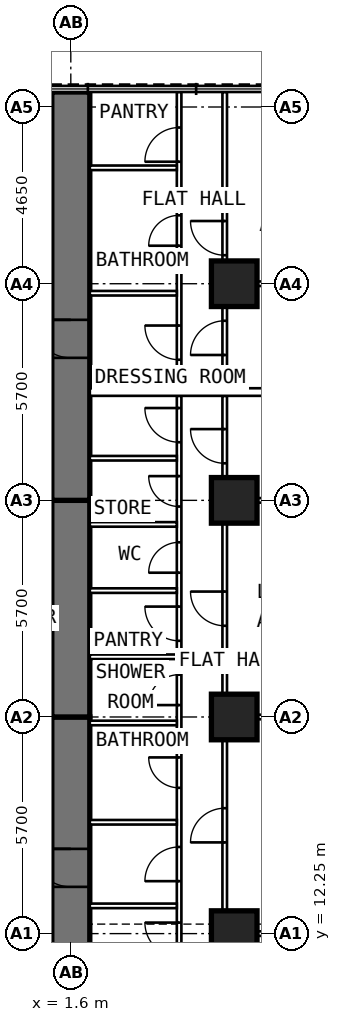
"""IFC4 building model, lengths in metres.
Left out: names, types, materials, properties, quantities, classifications, styles, units other than length and angle.
Written with IfcOpenShell. Run it as: python <this file> out.ifc"""

import sys

from ifc_helpers import new_model, si_unit, direction, frame, frame_2d, origin, origin_2d, place, context, subcontext, project, spatial, rectangle, extrude, element, fill, save


model = new_model("IFC4")
c1 = context("Model", 3, precision=1e-05, world=origin(), true_north=direction((0.0, 1.0)))
c2 = subcontext(c1, "Body", "Model", "MODEL_VIEW")
j1 = project(units=[si_unit("LENGTHUNIT", "METRE"), si_unit("PLANEANGLEUNIT", "RADIAN")], contexts=[c1])
p1 = place(None, origin())
s1 = spatial("IfcSite", under=j1, at=p1, CompositionType="ELEMENT")
p2 = place(p1, origin())
s2 = spatial("IfcBuilding", under=s1, at=p2, CompositionType="ELEMENT")
p3 = place(p2, frame((0.0, 0.0, 71.8)))
s3 = spatial("IfcBuildingStorey", under=s2, at=p3, CompositionType="ELEMENT", Elevation=71.8)
for number, where, z_axis, x_axis in (
    (1, (5.9, 12.25, 0.0), (0.0, 0.0, 1.0), (0.0, 1.0, 0.0)),
    (2, (5.9, 17.95, 0.0), (0.0, 0.0, 1.0), (0.0, 1.0, 0.0)),
    (3, (5.9, 23.65, 0.0), (0.0, 0.0, 1.0), (0.0, 1.0, 0.0)),
    (4, (5.9, 29.35, 0.0), (0.0, 0.0, 1.0), (0.0, 1.0, 0.0)),
):
    element("IfcColumn", number, at=place(p3, frame(where, z_axis=z_axis, x_axis=x_axis)), inside=s3, PredefinedType="COLUMN", context=c2, shape_type="SweptSolid", body=[
        extrude(rectangle(XDim=1.2, YDim=1.2, at=origin_2d()), origin(), (0.0, 0.0, 1.0), 3.6),
    ])
p4 = place(p3, frame((1.6, 9.6, 0.0), z_axis=(0.0, 0.0, 1.0), x_axis=(0.0, 1.0, 0.0)))
e5 = element("IfcWall", 5, at=p4, inside=s3, PredefinedType="SHEAR", context=c2, shape_type="SweptSolid", body=[
    extrude(rectangle(XDim=8.35, YDim=1.0, at=frame_2d((4.175, 0.0))), origin(), (0.0, 0.0, 1.0), 3.6),
])
p5 = place(p4, frame((3.88, 0.0, 0.0)))
e6 = element("IfcOpeningElement", 6, at=p5, cuts=e5, PredefinedType="OPENING", context=c2, shape_type="SweptSolid", body=[
    extrude(rectangle(XDim=1.0, YDim=2.1, at=frame_2d((0.5, 1.05))), frame((0.0, 0.512, 0.0), z_axis=(0.0, -1.0, 0.0), x_axis=(1.0, 0.0, 0.0)), (0.0, 0.0, 1.0), 1.024),
])
p6 = place(p3, frame((1.6, 17.95, 0.0), z_axis=(0.0, 0.0, 1.0), x_axis=(0.0, 1.0, 0.0)))
e7 = element("IfcWall", 7, at=p6, inside=s3, PredefinedType="SHEAR", context=c2, shape_type="SweptSolid", body=[
    extrude(rectangle(XDim=5.7, YDim=1.0, at=frame_2d((2.85, 0.0))), origin(), (0.0, 0.0, 1.0), 3.6),
])
p7 = place(p3, frame((1.6, 23.65, 0.0), z_axis=(0.0, 0.0, 1.0), x_axis=(0.0, 1.0, 0.0)))
e8 = element("IfcWall", 8, at=p7, inside=s3, PredefinedType="SHEAR", context=c2, shape_type="SweptSolid", body=[
    extrude(rectangle(XDim=10.745, YDim=1.0, at=frame_2d((5.373, 0.0))), origin(), (0.0, 0.0, 1.0), 3.6),
])
p8 = place(p7, frame((3.75, 0.0, 0.0)))
e9 = element("IfcOpeningElement", 9, at=p8, cuts=e8, PredefinedType="OPENING", context=c2, shape_type="SweptSolid", body=[
    extrude(rectangle(XDim=1.0, YDim=2.1, at=frame_2d((0.5, 1.05))), frame((0.0, 0.512, 0.0), z_axis=(0.0, -1.0, 0.0), x_axis=(1.0, 0.0, 0.0)), (0.0, 0.0, 1.0), 1.024),
])
p9 = place(p3, frame((4.45, 10.1, 0.0), z_axis=(0.0, 0.0, 1.0), x_axis=(0.0, 1.0, 0.0)))
e10 = element("IfcWall", 10, at=p9, inside=s3, PredefinedType="PARTITIONING", context=c2, shape_type="SweptSolid", body=[
    extrude(rectangle(XDim=16.3, YDim=0.12, at=frame_2d((8.15, 0.0))), origin(), (0.0, 0.0, 1.0), 3.35),
])
p10 = place(p9, frame((1.54, 0.0, 0.0)))
e11 = element("IfcOpeningElement", 11, at=p10, cuts=e10, PredefinedType="OPENING", context=c2, shape_type="SweptSolid", body=[
    extrude(rectangle(XDim=0.9, YDim=2.1, at=frame_2d((0.45, 1.05))), frame((0.0, 0.072, 0.0), z_axis=(0.0, -1.0, 0.0), x_axis=(1.0, 0.0, 0.0)), (0.0, 0.0, 1.0), 0.144),
])
p11 = place(p9, frame((3.53, 0.0, 0.0)))
e12 = element("IfcOpeningElement", 12, at=p11, cuts=e10, PredefinedType="OPENING", context=c2, shape_type="SweptSolid", body=[
    extrude(rectangle(XDim=0.9, YDim=2.1, at=frame_2d((0.45, 1.05))), frame((0.0, 0.072, 0.0), z_axis=(0.0, -1.0, 0.0), x_axis=(1.0, 0.0, 0.0)), (0.0, 0.0, 1.0), 0.144),
])
p12 = place(p9, frame((5.986, 0.0, 0.0)))
e13 = element("IfcOpeningElement", 13, at=p12, cuts=e10, PredefinedType="OPENING", context=c2, shape_type="SweptSolid", body=[
    extrude(rectangle(XDim=0.8, YDim=2.1, at=frame_2d((0.4, 1.05))), frame((0.0, 0.072, 0.0), z_axis=(0.0, -1.0, 0.0), x_axis=(1.0, 0.0, 0.0)), (0.0, 0.0, 1.0), 0.144),
])
p13 = place(p9, frame((8.163, 0.0, 0.0)))
e14 = element("IfcOpeningElement", 14, at=p13, cuts=e10, PredefinedType="OPENING", context=c2, shape_type="SweptSolid", body=[
    extrude(rectangle(XDim=0.8, YDim=2.1, at=frame_2d((0.4, 1.05))), frame((0.0, 0.072, 0.0), z_axis=(0.0, -1.0, 0.0), x_axis=(1.0, 0.0, 0.0)), (0.0, 0.0, 1.0), 0.144),
])
p14 = place(p9, frame((9.855, 0.0, 0.0)))
e15 = element("IfcOpeningElement", 15, at=p14, cuts=e10, PredefinedType="OPENING", context=c2, shape_type="SweptSolid", body=[
    extrude(rectangle(XDim=0.9, YDim=2.1, at=frame_2d((0.45, 1.05))), frame((0.0, 0.072, 0.0), z_axis=(0.0, -1.0, 0.0), x_axis=(1.0, 0.0, 0.0)), (0.0, 0.0, 1.0), 0.144),
])
p15 = place(p9, frame((11.646, 0.0, 0.0)))
e16 = element("IfcOpeningElement", 16, at=p15, cuts=e10, PredefinedType="OPENING", context=c2, shape_type="SweptSolid", body=[
    extrude(rectangle(XDim=0.8, YDim=2.1, at=frame_2d((0.4, 1.05))), frame((0.0, 0.072, 0.0), z_axis=(0.0, -1.0, 0.0), x_axis=(1.0, 0.0, 0.0)), (0.0, 0.0, 1.0), 0.144),
])
p16 = place(p9, frame((13.388, 0.0, 0.0)))
e17 = element("IfcOpeningElement", 17, at=p16, cuts=e10, PredefinedType="OPENING", context=c2, shape_type="SweptSolid", body=[
    extrude(rectangle(XDim=0.8, YDim=2.1, at=frame_2d((0.4, 1.05))), frame((0.0, 0.072, 0.0), z_axis=(0.0, -1.0, 0.0), x_axis=(1.0, 0.0, 0.0)), (0.0, 0.0, 1.0), 0.144),
])
p17 = place(p9, frame((15.079, 0.0, 0.0)))
e18 = element("IfcOpeningElement", 18, at=p17, cuts=e10, PredefinedType="OPENING", context=c2, shape_type="SweptSolid", body=[
    extrude(rectangle(XDim=0.9, YDim=2.1, at=frame_2d((0.45, 1.05))), frame((0.0, 0.072, 0.0), z_axis=(0.0, -1.0, 0.0), x_axis=(1.0, 0.0, 0.0)), (0.0, 0.0, 1.0), 0.144),
])
p18 = place(p3, frame((5.65, 9.6, 0.0), z_axis=(0.0, 0.0, 1.0), x_axis=(0.0, 1.0, 0.0)))
e19 = element("IfcWall", 19, at=p18, inside=s3, PredefinedType="PARTITIONING", context=c2, shape_type="SweptSolid", body=[
    extrude(rectangle(XDim=16.8, YDim=0.12, at=frame_2d((8.4, 0.0))), origin(), (0.0, 0.0, 1.0), 3.35),
])
p19 = place(p18, frame((1.0, 0.0, 0.0)))
e20 = element("IfcOpeningElement", 20, at=p19, cuts=e19, PredefinedType="OPENING", context=c2, shape_type="SweptSolid", body=[
    extrude(rectangle(XDim=0.9, YDim=2.1, at=frame_2d((0.45, 1.05))), frame((0.0, 0.072, 0.0), z_axis=(0.0, -1.0, 0.0), x_axis=(1.0, 0.0, 0.0)), (0.0, 0.0, 1.0), 0.144),
])
p20 = place(p18, frame((5.05, 0.0, 0.0)))
e21 = element("IfcOpeningElement", 21, at=p20, cuts=e19, PredefinedType="OPENING", context=c2, shape_type="SweptSolid", body=[
    extrude(rectangle(XDim=0.9, YDim=2.1, at=frame_2d((0.45, 1.05))), frame((0.0, 0.072, 0.0), z_axis=(0.0, -1.0, 0.0), x_axis=(1.0, 0.0, 0.0)), (0.0, 0.0, 1.0), 0.144),
])
p21 = place(p18, frame((10.75, 0.0, 0.0)))
e22 = element("IfcOpeningElement", 22, at=p21, cuts=e19, PredefinedType="OPENING", context=c2, shape_type="SweptSolid", body=[
    extrude(rectangle(XDim=0.9, YDim=2.1, at=frame_2d((0.45, 1.05))), frame((0.0, 0.072, 0.0), z_axis=(0.0, -1.0, 0.0), x_axis=(1.0, 0.0, 0.0)), (0.0, 0.0, 1.0), 0.144),
])
p22 = place(p18, frame((15.025, 0.0, 0.0)))
e23 = element("IfcOpeningElement", 23, at=p22, cuts=e19, PredefinedType="OPENING", context=c2, shape_type="SweptSolid", body=[
    extrude(rectangle(XDim=0.9, YDim=2.1, at=frame_2d((0.45, 1.05))), frame((0.0, 0.072, 0.0), z_axis=(0.0, -1.0, 0.0), x_axis=(1.0, 0.0, 0.0)), (0.0, 0.0, 1.0), 0.144),
])
for number, where, z_axis, x_axis in (
    (24, (5.71, 12.25, 0.0), (0.0, 0.0, 1.0), (1.0, 0.0, 0.0)),
    (25, (5.71, 17.95, 0.0), (0.0, 0.0, 1.0), (1.0, 0.0, 0.0)),
    (26, (5.71, 23.65, 0.0), (0.0, 0.0, 1.0), (1.0, 0.0, 0.0)),
):
    element("IfcWall", number, at=place(p3, frame(where, z_axis=z_axis, x_axis=x_axis)), inside=s3, PredefinedType="PARTITIONING", context=c2, shape_type="SweptSolid", body=[
        extrude(rectangle(XDim=4.99, YDim=0.12, at=frame_2d((2.495, 0.0))), origin(), (0.0, 0.0, 1.0), 2.45),
    ])
for number, where, z_axis, x_axis in (
    (27, (2.1, 12.98, 0.0), (0.0, 0.0, 1.0), (1.0, 0.0, 0.0)),
    (28, (2.1, 15.18, 0.0), (0.0, 0.0, 1.0), (1.0, 0.0, 0.0)),
):
    element("IfcWall", number, at=place(p3, frame(where, z_axis=z_axis, x_axis=x_axis)), inside=s3, PredefinedType="PARTITIONING", context=c2, shape_type="SweptSolid", body=[
        extrude(rectangle(XDim=2.29, YDim=0.12, at=frame_2d((1.145, 0.0))), origin(), (0.0, 0.0, 1.0), 3.35),
    ])
p23 = place(p3, frame((2.1, 17.792, 0.0), z_axis=(0.0, 0.0, 1.0), x_axis=(1.0, 0.0, 0.0)))
e29 = element("IfcWall", 29, at=p23, inside=s3, PredefinedType="PARTITIONING", context=c2, shape_type="SweptSolid", body=[
    extrude(rectangle(XDim=2.29, YDim=0.12, at=frame_2d((1.145, 0.0))), origin(), (0.0, 0.0, 1.0), 2.45),
])
for number, where, z_axis, x_axis in (
    (30, (2.1, 19.534, 0.0), (0.0, 0.0, 1.0), (1.0, 0.0, 0.0)),
    (31, (2.1, 21.275, 0.0), (0.0, 0.0, 1.0), (1.0, 0.0, 0.0)),
    (32, (2.1, 23.017, 0.0), (0.0, 0.0, 1.0), (1.0, 0.0, 0.0)),
    (33, (2.1, 24.759, 0.0), (0.0, 0.0, 1.0), (1.0, 0.0, 0.0)),
):
    element("IfcWall", number, at=place(p3, frame(where, z_axis=z_axis, x_axis=x_axis)), inside=s3, PredefinedType="PARTITIONING", context=c2, shape_type="SweptSolid", body=[
        extrude(rectangle(XDim=2.29, YDim=0.12, at=frame_2d((1.145, 0.0))), origin(), (0.0, 0.0, 1.0), 3.35),
    ])
p24 = place(p3, frame((4.45, 26.6, 0.0), z_axis=(0.0, 0.0, 1.0), x_axis=(0.0, 1.0, 0.0)))
e34 = element("IfcWall", 34, at=p24, inside=s3, PredefinedType="PARTITIONING", context=c2, shape_type="SweptSolid", body=[
    extrude(rectangle(XDim=7.795, YDim=0.12, at=frame_2d((3.897, 0.0))), origin(), (0.0, 0.0, 1.0), 3.35),
])
p25 = place(p24, frame((0.75, 0.0, 0.0)))
e35 = element("IfcOpeningElement", 35, at=p25, cuts=e34, PredefinedType="OPENING", context=c2, shape_type="SweptSolid", body=[
    extrude(rectangle(XDim=0.9, YDim=2.1, at=frame_2d((0.45, 1.05))), frame((0.0, 0.072, 0.0), z_axis=(0.0, -1.0, 0.0), x_axis=(1.0, 0.0, 0.0)), (0.0, 0.0, 1.0), 0.144),
])
p26 = place(p24, frame((3.75, 0.0, 0.0)))
e36 = element("IfcOpeningElement", 36, at=p26, cuts=e34, PredefinedType="OPENING", context=c2, shape_type="SweptSolid", body=[
    extrude(rectangle(XDim=0.8, YDim=2.1, at=frame_2d((0.4, 1.05))), frame((0.0, 0.072, 0.0), z_axis=(0.0, -1.0, 0.0), x_axis=(1.0, 0.0, 0.0)), (0.0, 0.0, 1.0), 0.144),
])
p27 = place(p24, frame((5.96, 0.0, 0.0)))
e37 = element("IfcOpeningElement", 37, at=p27, cuts=e34, PredefinedType="OPENING", context=c2, shape_type="SweptSolid", body=[
    extrude(rectangle(XDim=0.9, YDim=2.1, at=frame_2d((0.45, 1.05))), frame((0.0, 0.072, 0.0), z_axis=(0.0, -1.0, 0.0), x_axis=(1.0, 0.0, 0.0)), (0.0, 0.0, 1.0), 0.144),
])
p28 = place(p3, frame((5.65, 26.6, 0.0), z_axis=(0.0, 0.0, 1.0), x_axis=(0.0, 1.0, 0.0)))
e38 = element("IfcWall", 38, at=p28, inside=s3, PredefinedType="PARTITIONING", context=c2, shape_type="SweptSolid", body=[
    extrude(rectangle(XDim=7.795, YDim=0.12, at=frame_2d((3.897, 0.0))), origin(), (0.0, 0.0, 1.0), 3.35),
])
p29 = place(p28, frame((0.875, 0.0, 0.0)))
e39 = element("IfcOpeningElement", 39, at=p29, cuts=e38, PredefinedType="OPENING", context=c2, shape_type="SweptSolid", body=[
    extrude(rectangle(XDim=0.9, YDim=2.1, at=frame_2d((0.45, 1.05))), frame((0.0, 0.072, 0.0), z_axis=(0.0, -1.0, 0.0), x_axis=(1.0, 0.0, 0.0)), (0.0, 0.0, 1.0), 0.144),
])
p30 = place(p28, frame((3.5, 0.0, 0.0)))
e40 = element("IfcOpeningElement", 40, at=p30, cuts=e38, PredefinedType="OPENING", context=c2, shape_type="SweptSolid", body=[
    extrude(rectangle(XDim=0.9, YDim=2.1, at=frame_2d((0.45, 1.05))), frame((0.0, 0.072, 0.0), z_axis=(0.0, -1.0, 0.0), x_axis=(1.0, 0.0, 0.0)), (0.0, 0.0, 1.0), 0.144),
])
p31 = place(p3, frame((5.71, 29.35, 0.0), z_axis=(0.0, 0.0, 1.0), x_axis=(1.0, 0.0, 0.0)))
e41 = element("IfcWall", 41, at=p31, inside=s3, PredefinedType="PARTITIONING", context=c2, shape_type="SweptSolid", body=[
    extrude(rectangle(XDim=4.99, YDim=0.12, at=frame_2d((2.495, 0.0))), origin(), (0.0, 0.0, 1.0), 2.45),
])
p32 = place(p3, frame((2.1, 29.1, 0.0), z_axis=(0.0, 0.0, 1.0), x_axis=(1.0, 0.0, 0.0)))
e42 = element("IfcWall", 42, at=p32, inside=s3, PredefinedType="PARTITIONING", context=c2, shape_type="SweptSolid", body=[
    extrude(rectangle(XDim=2.29, YDim=0.12, at=frame_2d((1.145, 0.0))), origin(), (0.0, 0.0, 1.0), 2.45),
])
p33 = place(p3, frame((2.1, 32.4, 0.0), z_axis=(0.0, 0.0, 1.0), x_axis=(1.0, 0.0, 0.0)))
e43 = element("IfcWall", 43, at=p33, inside=s3, PredefinedType="PARTITIONING", context=c2, shape_type="SweptSolid", body=[
    extrude(rectangle(XDim=2.29, YDim=0.12, at=frame_2d((1.145, 0.0))), origin(), (0.0, 0.0, 1.0), 3.35),
])
p34 = place(p3, frame((2.1, 26.5, 0.0), z_axis=(0.0, 0.0, 1.0), x_axis=(1.0, 0.0, 0.0)))
e44 = element("IfcWall", 44, at=p34, inside=s3, PredefinedType="PARTITIONING", context=c2, shape_type="SweptSolid", body=[
    extrude(rectangle(XDim=8.6, YDim=0.2, at=frame_2d((4.3, 0.0))), origin(), (0.0, 0.0, 1.0), 3.35),
])
p35 = place(p5, origin())
e45 = element("IfcDoor", 45, at=p35, inside=s3, OperationType="SINGLE_SWING_RIGHT", PredefinedType="DOOR", context=c2, shape_type="SweptSolid", body=[
    extrude(rectangle(XDim=1.0, YDim=2.1, at=frame_2d((0.5, 1.05))), frame((0.0, 0.25, 0.0), z_axis=(0.0, -1.0, 0.0), x_axis=(1.0, 0.0, 0.0)), (0.0, 0.0, 1.0), 0.5),
])
fill(e6, e45)
p36 = place(p20, origin())
e46 = element("IfcDoor", 46, at=p36, inside=s3, OperationType="SINGLE_SWING_LEFT", PredefinedType="DOOR", context=c2, shape_type="SweptSolid", body=[
    extrude(rectangle(XDim=0.9, YDim=2.1, at=frame_2d((0.45, 1.05))), frame((0.0, 0.025, 0.0), z_axis=(0.0, -1.0, 0.0), x_axis=(1.0, 0.0, 0.0)), (0.0, 0.0, 1.0), 0.05),
])
fill(e21, e46)
p37 = place(p21, origin())
e47 = element("IfcDoor", 47, at=p37, inside=s3, OperationType="SINGLE_SWING_RIGHT", PredefinedType="DOOR", context=c2, shape_type="SweptSolid", body=[
    extrude(rectangle(XDim=0.9, YDim=2.1, at=frame_2d((0.45, 1.05))), frame((0.0, 0.025, 0.0), z_axis=(0.0, -1.0, 0.0), x_axis=(1.0, 0.0, 0.0)), (0.0, 0.0, 1.0), 0.05),
])
fill(e22, e47)
p38 = place(p22, origin())
e48 = element("IfcDoor", 48, at=p38, inside=s3, OperationType="SINGLE_SWING_RIGHT", PredefinedType="DOOR", context=c2, shape_type="SweptSolid", body=[
    extrude(rectangle(XDim=0.9, YDim=2.1, at=frame_2d((0.45, 1.05))), frame((0.0, 0.025, 0.0), z_axis=(0.0, -1.0, 0.0), x_axis=(1.0, 0.0, 0.0)), (0.0, 0.0, 1.0), 0.05),
])
fill(e23, e48)
p39 = place(p10, origin())
e49 = element("IfcDoor", 49, at=p39, inside=s3, OperationType="SINGLE_SWING_RIGHT", PredefinedType="DOOR", context=c2, shape_type="SweptSolid", body=[
    extrude(rectangle(XDim=0.9, YDim=2.1, at=frame_2d((0.45, 1.05))), frame((0.0, 0.025, 0.0), z_axis=(0.0, -1.0, 0.0), x_axis=(1.0, 0.0, 0.0)), (0.0, 0.0, 1.0), 0.05),
])
fill(e11, e49)
p40 = place(p11, origin())
e50 = element("IfcDoor", 50, at=p40, inside=s3, OperationType="SINGLE_SWING_LEFT", PredefinedType="DOOR", context=c2, shape_type="SweptSolid", body=[
    extrude(rectangle(XDim=0.9, YDim=2.1, at=frame_2d((0.45, 1.05))), frame((0.0, 0.025, 0.0), z_axis=(0.0, -1.0, 0.0), x_axis=(1.0, 0.0, 0.0)), (0.0, 0.0, 1.0), 0.05),
])
fill(e12, e50)
p41 = place(p12, origin())
e51 = element("IfcDoor", 51, at=p41, inside=s3, OperationType="SINGLE_SWING_RIGHT", PredefinedType="DOOR", context=c2, shape_type="SweptSolid", body=[
    extrude(rectangle(XDim=0.8, YDim=2.1, at=frame_2d((0.4, 1.05))), frame((0.0, 0.025, 0.0), z_axis=(0.0, -1.0, 0.0), x_axis=(1.0, 0.0, 0.0)), (0.0, 0.0, 1.0), 0.05),
])
fill(e13, e51)
p42 = place(p13, origin())
e52 = element("IfcDoor", 52, at=p42, inside=s3, OperationType="SINGLE_SWING_LEFT", PredefinedType="DOOR", context=c2, shape_type="SweptSolid", body=[
    extrude(rectangle(XDim=0.8, YDim=2.1, at=frame_2d((0.4, 1.05))), frame((0.0, 0.025, 0.0), z_axis=(0.0, -1.0, 0.0), x_axis=(1.0, 0.0, 0.0)), (0.0, 0.0, 1.0), 0.05),
])
fill(e14, e52)
p43 = place(p14, origin())
e53 = element("IfcDoor", 53, at=p43, inside=s3, OperationType="SINGLE_SWING_RIGHT", PredefinedType="DOOR", context=c2, shape_type="SweptSolid", body=[
    extrude(rectangle(XDim=0.9, YDim=2.1, at=frame_2d((0.45, 1.05))), frame((0.0, 0.025, 0.0), z_axis=(0.0, -1.0, 0.0), x_axis=(1.0, 0.0, 0.0)), (0.0, 0.0, 1.0), 0.05),
])
fill(e15, e53)
p44 = place(p15, origin())
e54 = element("IfcDoor", 54, at=p44, inside=s3, OperationType="SINGLE_SWING_LEFT", PredefinedType="DOOR", context=c2, shape_type="SweptSolid", body=[
    extrude(rectangle(XDim=0.8, YDim=2.1, at=frame_2d((0.4, 1.05))), frame((0.0, 0.025, 0.0), z_axis=(0.0, -1.0, 0.0), x_axis=(1.0, 0.0, 0.0)), (0.0, 0.0, 1.0), 0.05),
])
fill(e16, e54)
p45 = place(p16, origin())
e55 = element("IfcDoor", 55, at=p45, inside=s3, OperationType="SINGLE_SWING_RIGHT", PredefinedType="DOOR", context=c2, shape_type="SweptSolid", body=[
    extrude(rectangle(XDim=0.8, YDim=2.1, at=frame_2d((0.4, 1.05))), frame((0.0, 0.025, 0.0), z_axis=(0.0, -1.0, 0.0), x_axis=(1.0, 0.0, 0.0)), (0.0, 0.0, 1.0), 0.05),
])
fill(e17, e55)
p46 = place(p17, origin())
e56 = element("IfcDoor", 56, at=p46, inside=s3, OperationType="SINGLE_SWING_RIGHT", PredefinedType="DOOR", context=c2, shape_type="SweptSolid", body=[
    extrude(rectangle(XDim=0.9, YDim=2.1, at=frame_2d((0.45, 1.05))), frame((0.0, 0.025, 0.0), z_axis=(0.0, -1.0, 0.0), x_axis=(1.0, 0.0, 0.0)), (0.0, 0.0, 1.0), 0.05),
])
fill(e18, e56)
p47 = place(p8, origin())
e57 = element("IfcDoor", 57, at=p47, inside=s3, OperationType="SINGLE_SWING_RIGHT", PredefinedType="DOOR", context=c2, shape_type="SweptSolid", body=[
    extrude(rectangle(XDim=1.0, YDim=2.1, at=frame_2d((0.5, 1.05))), frame((0.0, 0.25, 0.0), z_axis=(0.0, -1.0, 0.0), x_axis=(1.0, 0.0, 0.0)), (0.0, 0.0, 1.0), 0.5),
])
fill(e9, e57)
p48 = place(p29, origin())
e58 = element("IfcDoor", 58, at=p48, inside=s3, OperationType="SINGLE_SWING_LEFT", PredefinedType="DOOR", context=c2, shape_type="SweptSolid", body=[
    extrude(rectangle(XDim=0.9, YDim=2.1, at=frame_2d((0.45, 1.05))), frame((0.0, 0.025, 0.0), z_axis=(0.0, -1.0, 0.0), x_axis=(1.0, 0.0, 0.0)), (0.0, 0.0, 1.0), 0.05),
])
fill(e39, e58)
p49 = place(p30, origin())
e59 = element("IfcDoor", 59, at=p49, inside=s3, OperationType="SINGLE_SWING_RIGHT", PredefinedType="DOOR", context=c2, shape_type="SweptSolid", body=[
    extrude(rectangle(XDim=0.9, YDim=2.1, at=frame_2d((0.45, 1.05))), frame((0.0, 0.025, 0.0), z_axis=(0.0, -1.0, 0.0), x_axis=(1.0, 0.0, 0.0)), (0.0, 0.0, 1.0), 0.05),
])
fill(e40, e59)
p50 = place(p25, origin())
e60 = element("IfcDoor", 60, at=p50, inside=s3, OperationType="SINGLE_SWING_RIGHT", PredefinedType="DOOR", context=c2, shape_type="SweptSolid", body=[
    extrude(rectangle(XDim=0.9, YDim=2.1, at=frame_2d((0.45, 1.05))), frame((0.0, 0.025, 0.0), z_axis=(0.0, -1.0, 0.0), x_axis=(1.0, 0.0, 0.0)), (0.0, 0.0, 1.0), 0.05),
])
fill(e35, e60)
p51 = place(p26, origin())
e61 = element("IfcDoor", 61, at=p51, inside=s3, OperationType="SINGLE_SWING_LEFT", PredefinedType="DOOR", context=c2, shape_type="SweptSolid", body=[
    extrude(rectangle(XDim=0.8, YDim=2.1, at=frame_2d((0.4, 1.05))), frame((0.0, 0.025, 0.0), z_axis=(0.0, -1.0, 0.0), x_axis=(1.0, 0.0, 0.0)), (0.0, 0.0, 1.0), 0.05),
])
fill(e36, e61)
p52 = place(p27, origin())
e62 = element("IfcDoor", 62, at=p52, inside=s3, OperationType="SINGLE_SWING_LEFT", PredefinedType="DOOR", context=c2, shape_type="SweptSolid", body=[
    extrude(rectangle(XDim=0.9, YDim=2.1, at=frame_2d((0.45, 1.05))), frame((0.0, 0.025, 0.0), z_axis=(0.0, -1.0, 0.0), x_axis=(1.0, 0.0, 0.0)), (0.0, 0.0, 1.0), 0.05),
])
fill(e37, e62)
save(model, sys.argv[1])
